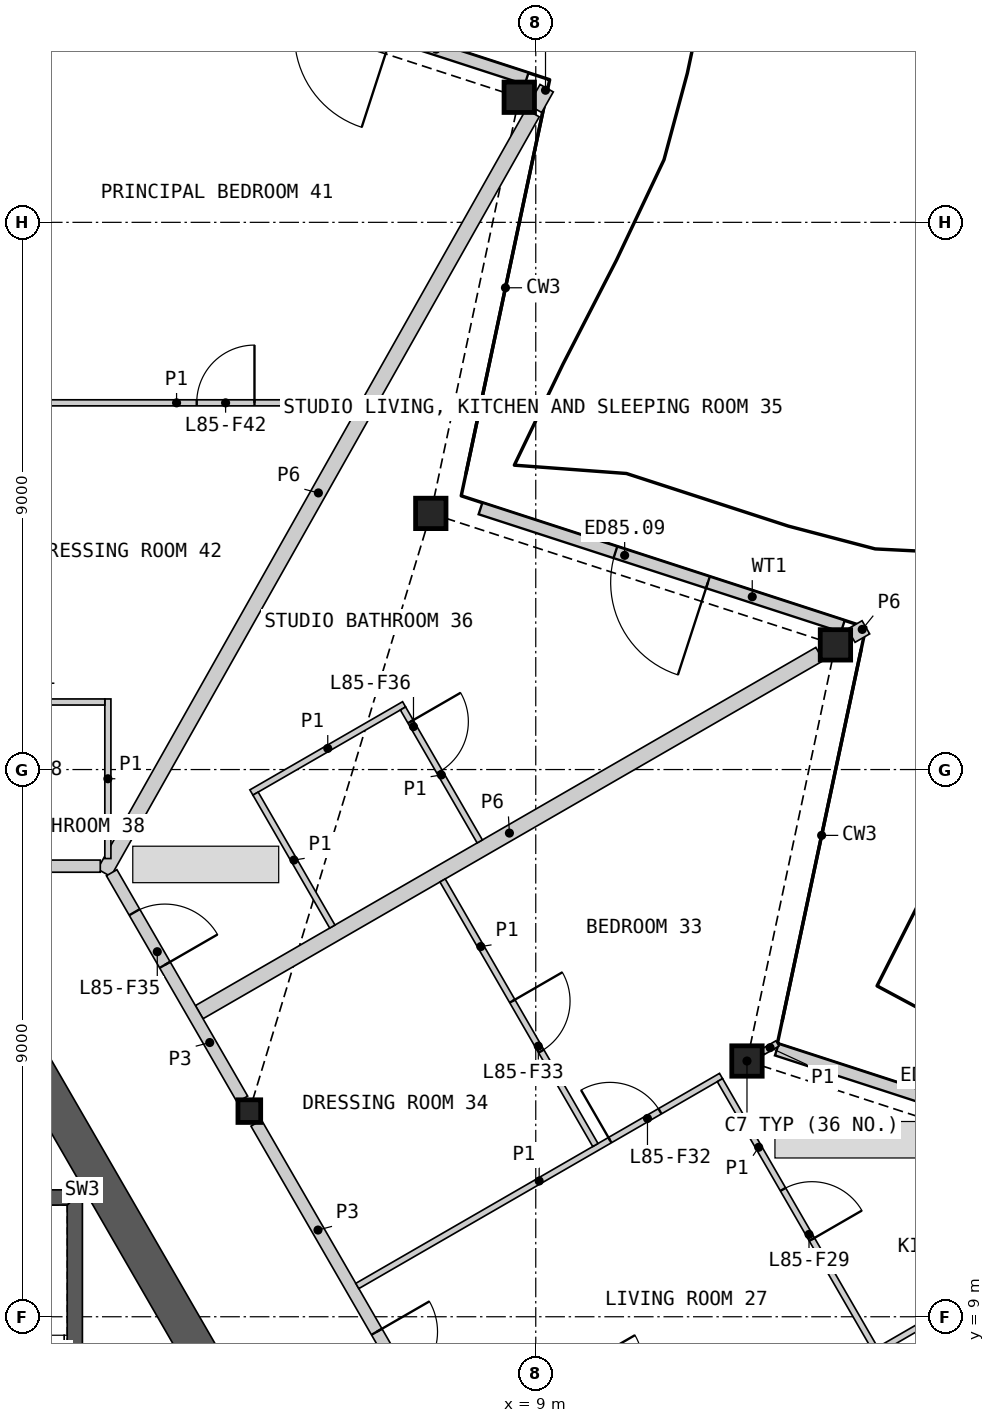
"""IFC4 building model, lengths in metres.
Left out: names, types, materials, properties, quantities, classifications, styles, units other than length and angle.
Written with IfcOpenShell. Run it as: python <this file> out.ifc"""

import sys

from ifc_helpers import new_model, si_unit, direction, frame, frame_2d, origin, origin_2d, place, context, subcontext, project, spatial, polyline, rectangle, hollow_rectangle, i_section, outline, extrude, element, fill, save


model = new_model("IFC4")
c1 = context("Model", 3, precision=1e-05, world=origin(), true_north=direction((0.0, 1.0)))
c2 = subcontext(c1, "Body", "Model", "MODEL_VIEW")
j1 = project(units=[si_unit("LENGTHUNIT", "METRE"), si_unit("PLANEANGLEUNIT", "RADIAN")], contexts=[c1])
p1 = place(None, origin())
s1 = spatial("IfcSite", under=j1, at=p1, CompositionType="ELEMENT")
p2 = place(p1, origin())
s2 = spatial("IfcBuilding", under=s1, at=p2, CompositionType="ELEMENT")
p3 = place(p2, frame((0.0, 0.0, 378.0)))
s3 = spatial("IfcBuildingStorey", under=s2, at=p3, CompositionType="ELEMENT", Elevation=378.0)
for number, where, z_axis, x_axis in (
    (1, (12.474, 13.206, 0.0), (0.0, 0.0, 1.0), (1.0, 0.0, 0.0)),
    (2, (13.929, 20.051, 0.0), (0.0, 0.0, 1.0), (1.0, 0.0, 0.0)),
    (3, (7.274, 22.213, 0.0), (0.0, 0.0, 1.0), (1.0, 0.0, 0.0)),
    (4, (8.729, 29.057, 0.0), (0.0, 0.0, 1.0), (1.0, 0.0, 0.0)),
):
    element("IfcColumn", number, at=place(p3, frame(where, z_axis=z_axis, x_axis=x_axis)), inside=s3, PredefinedType="COLUMN", context=c2, shape_type="SweptSolid", body=[
        extrude(hollow_rectangle(XDim=0.5, YDim=0.5, WallThickness=0.03, at=origin_2d()), origin(), (0.0, 0.0, 1.0), 3.4),
    ])
p4 = place(p3, frame((4.289, 12.382, 0.0), z_axis=(0.0, 0.0, 1.0), x_axis=(1.0, 0.0, 0.0)))
e5 = element("IfcColumn", 5, at=p4, inside=s3, PredefinedType="COLUMN", context=c2, shape_type="SweptSolid", body=[
    extrude(i_section(OverallWidth=0.374, OverallDepth=0.372, WebThickness=0.016, FlangeThickness=0.026, at=origin_2d()), origin(), (0.0, 0.0, 1.0), 3.4),
])
p5 = place(p3, frame((19.25, 11.351, 0.0), z_axis=(0.0, 0.0, 1.0), x_axis=(-0.951060668786, 0.309004214029, 0.0)))
e6 = element("IfcWall", 6, at=p5, inside=s3, PredefinedType="SOLIDWALL", context=c2, shape_type="SweptSolid", body=[
    extrude(rectangle(XDim=6.609, YDim=0.2, at=frame_2d((3.305, 0.0))), origin(), (0.0, 0.0, 1.0), 2.634),
])
p6 = place(p5, frame((2.333, 0.0, 0.0)))
e7 = element("IfcOpeningElement", 7, at=p6, cuts=e6, PredefinedType="OPENING", context=c2, shape_type="SweptSolid", body=[
    extrude(rectangle(XDim=1.6, YDim=2.25, at=frame_2d((0.8, 1.125))), frame((0.0, 0.11, 0.0), z_axis=(0.0, -1.0, 0.0), x_axis=(1.0, 0.0, 0.0)), (0.0, 0.0, 1.0), 0.22),
])
p7 = place(p3, frame((14.05, 20.357, 0.0), z_axis=(0.0, 0.0, 1.0), x_axis=(-0.951060123915, 0.309005891041, 0.0)))
e8 = element("IfcWall", 8, at=p7, inside=s3, PredefinedType="SOLIDWALL", context=c2, shape_type="SweptSolid", body=[
    extrude(rectangle(XDim=6.265, YDim=0.2, at=frame_2d((3.133, 0.0))), origin(), (0.0, 0.0, 1.0), 2.634),
])
p8 = place(p7, frame((2.333, 0.0, 0.0)))
e9 = element("IfcOpeningElement", 9, at=p8, cuts=e8, PredefinedType="OPENING", context=c2, shape_type="SweptSolid", body=[
    extrude(rectangle(XDim=1.6, YDim=2.25, at=frame_2d((0.8, 1.125))), frame((0.0, 0.11, 0.0), z_axis=(0.0, -1.0, 0.0), x_axis=(1.0, 0.0, 0.0)), (0.0, 0.0, 1.0), 0.22),
])
p9 = place(p3, frame((8.85, 29.364, 0.0), z_axis=(0.0, 0.0, 1.0), x_axis=(-0.951048671744, 0.309041136379, 0.0)))
e10 = element("IfcWall", 10, at=p9, inside=s3, PredefinedType="SOLIDWALL", context=c2, shape_type="SweptSolid", body=[
    extrude(rectangle(XDim=6.265, YDim=0.2, at=frame_2d((3.133, 0.0))), origin(), (0.0, 0.0, 1.0), 2.634),
])
p10 = place(p9, frame((2.333, 0.0, 0.0)))
e11 = element("IfcOpeningElement", 11, at=p10, cuts=e10, PredefinedType="OPENING", context=c2, shape_type="SweptSolid", body=[
    extrude(rectangle(XDim=1.6, YDim=2.25, at=frame_2d((0.8, 1.125))), frame((0.0, 0.11, 0.0), z_axis=(0.0, -1.0, 0.0), x_axis=(1.0, 0.0, 0.0)), (0.0, 0.0, 1.0), 0.22),
])
p11 = place(p3, origin())
e12 = element("IfcWall", 12, at=p11, inside=s3, PredefinedType="SHEAR", context=c2, shape_type="SweptSolid", body=[
    extrude(outline(polyline([(1.544, 5.237), (1.544, 11.087), (1.294, 10.837), (1.294, 5.237), (1.544, 5.237)])), origin(), (0.0, 0.0, 1.0), 3.1),
])
p12 = place(p3, origin())
e13 = element("IfcWall", 13, at=p12, inside=s3, PredefinedType="SHEAR", context=c2, shape_type="SweptSolid", body=[
    extrude(outline(polyline([(1.544, 11.087), (-1.544, 11.087), (-1.294, 10.837), (1.294, 10.837), (1.544, 11.087)])), origin(), (0.0, 0.0, 1.0), 3.1),
])
p13 = place(p3, frame((8.686, -0.634, 0.0), z_axis=(0.0, 0.0, 1.0), x_axis=(-0.500004601921, 0.866022746848, 0.0)))
e14 = element("IfcWall", 14, at=p13, inside=s3, PredefinedType="SHEAR", context=c2, shape_type="SweptSolid", body=[
    extrude(rectangle(XDim=16.853, YDim=0.6, at=frame_2d((8.426, 0.0))), origin(), (0.0, 0.0, 1.0), 3.1),
])
p14 = place(p3, frame((1.902, 16.302, 0.0), z_axis=(0.0, 0.0, 1.0), x_axis=(0.491233789602, 0.871027763021, 0.0)))
e15 = element("IfcWall", 15, at=p14, inside=s3, PredefinedType="PARTITIONING", context=c2, shape_type="SweptSolid", body=[
    extrude(rectangle(XDim=14.345, YDim=0.25, at=frame_2d((7.173, 0.0))), origin(), (0.0, 0.0, 1.0), 2.33),
])
p15 = place(p3, frame((3.465, 14.01, 0.0), z_axis=(0.0, 0.0, 1.0), x_axis=(0.866032376801, 0.499987922186, 0.0)))
e16 = element("IfcWall", 16, at=p15, inside=s3, PredefinedType="PARTITIONING", context=c2, shape_type="SweptSolid", body=[
    extrude(rectangle(XDim=11.782, YDim=0.25, at=frame_2d((5.891, 0.0))), origin(), (0.0, 0.0, 1.0), 2.33),
])
p16 = place(p3, frame((4.403, 12.185, 0.0), z_axis=(0.0, 0.0, 1.0), x_axis=(0.499992155518, -0.866029932751, 0.0)))
e17 = element("IfcWall", 17, at=p16, inside=s3, PredefinedType="PARTITIONING", context=c2, shape_type="SweptSolid", body=[
    extrude(rectangle(XDim=8.123, YDim=0.2, at=frame_2d((4.062, 0.0))), origin(), (0.0, 0.0, 1.0), 3.1),
])
p17 = place(p16, frame((3.963, 0.0, 0.0)))
e18 = element("IfcOpeningElement", 18, at=p17, cuts=e17, PredefinedType="OPENING", context=c2, shape_type="SweptSolid", body=[
    extrude(rectangle(XDim=1.0, YDim=2.1, at=frame_2d((0.5, 1.05))), frame((0.0, 0.11, 0.0), z_axis=(0.0, -1.0, 0.0), x_axis=(1.0, 0.0, 0.0)), (0.0, 0.0, 1.0), 0.22),
])
p18 = place(p3, frame((2.025, 16.303, 0.0), z_axis=(0.0, 0.0, 1.0), x_axis=(0.500004215162, -0.866022970146, 0.0)))
e19 = element("IfcWall", 19, at=p18, inside=s3, PredefinedType="PARTITIONING", context=c2, shape_type="SweptSolid", body=[
    extrude(rectangle(XDim=4.3, YDim=0.2, at=frame_2d((2.15, 0.0))), origin(), (0.0, 0.0, 1.0), 3.1),
])
p19 = place(p18, frame((0.75, 0.0, 0.0)))
e20 = element("IfcOpeningElement", 20, at=p19, cuts=e19, PredefinedType="OPENING", context=c2, shape_type="SweptSolid", body=[
    extrude(rectangle(XDim=1.0, YDim=2.1, at=frame_2d((0.5, 1.05))), frame((0.0, 0.11, 0.0), z_axis=(0.0, -1.0, 0.0), x_axis=(1.0, 0.0, 0.0)), (0.0, 0.0, 1.0), 0.22),
])
p20 = place(p3, frame((-1.863, 16.411, 0.0), z_axis=(0.0, 0.0, 1.0), x_axis=(1.0, 0.0, 0.0)))
e21 = element("IfcWall", 21, at=p20, inside=s3, PredefinedType="PARTITIONING", context=c2, shape_type="SweptSolid", body=[
    extrude(rectangle(XDim=3.701, YDim=0.2, at=frame_2d((1.851, 0.0))), origin(), (0.0, 0.0, 1.0), 3.1),
])
p21 = place(p20, frame((0.25, 0.0, 0.0)))
e22 = element("IfcOpeningElement", 22, at=p21, cuts=e21, PredefinedType="OPENING", context=c2, shape_type="SweptSolid", body=[
    extrude(rectangle(XDim=1.0, YDim=2.1, at=frame_2d((0.5, 1.05))), frame((0.0, 0.11, 0.0), z_axis=(0.0, -1.0, 0.0), x_axis=(1.0, 0.0, 0.0)), (0.0, 0.0, 1.0), 0.22),
])
p22 = place(p3, frame((8.989, 28.868, 0.0), z_axis=(0.0, 0.0, 1.0), x_axis=(0.491394522511, 0.870937094885, 0.0)))
e23 = element("IfcWall", 23, at=p22, inside=s3, PredefinedType="PARTITIONING", context=c2, shape_type="SweptSolid", body=[
    extrude(rectangle(XDim=0.388, YDim=0.25, at=frame_2d((0.194, 0.0))), origin(), (0.0, 0.0, 1.0), 2.33),
])
p23 = place(p3, frame((14.189, 20.201, 0.0), z_axis=(0.0, 0.0, 1.0), x_axis=(0.865687176694, 0.50058536945, 0.0)))
e24 = element("IfcWall", 24, at=p23, inside=s3, PredefinedType="PARTITIONING", context=c2, shape_type="SweptSolid", body=[
    extrude(rectangle(XDim=0.278, YDim=0.25, at=frame_2d((0.139, 0.0))), origin(), (0.0, 0.0, 1.0), 2.33),
])
p24 = place(p3, frame((8.775, 5.066, 0.0), z_axis=(0.0, 0.0, 1.0), x_axis=(0.866023724155, 0.500002909193, 0.0)))
e25 = element("IfcWall", 25, at=p24, inside=s3, PredefinedType="PARTITIONING", context=c2, shape_type="SweptSolid", body=[
    extrude(rectangle(XDim=11.655, YDim=0.1, at=frame_2d((5.827, 0.0))), origin(), (0.0, 0.0, 1.0), 2.33),
])
p25 = place(p24, frame((3.751, 0.0, 0.0)))
e26 = element("IfcOpeningElement", 26, at=p25, cuts=e25, PredefinedType="OPENING", context=c2, shape_type="SweptSolid", body=[
    extrude(rectangle(XDim=0.95, YDim=2.1, at=frame_2d((0.475, 1.05))), frame((0.0, 0.06, 0.0), z_axis=(0.0, -1.0, 0.0), x_axis=(1.0, 0.0, 0.0)), (0.0, 0.0, 1.0), 0.12),
])
p26 = place(p3, frame((6.065, 9.506, 0.0), z_axis=(0.0, 0.0, 1.0), x_axis=(0.866029020252, 0.499993736042, 0.0)))
e27 = element("IfcWall", 27, at=p26, inside=s3, PredefinedType="PARTITIONING", context=c2, shape_type="SweptSolid", body=[
    extrude(rectangle(XDim=6.907, YDim=0.1, at=frame_2d((3.454, 0.0))), origin(), (0.0, 0.0, 1.0), 2.33),
])
p27 = place(p26, frame((4.798, 0.0, 0.0)))
e28 = element("IfcOpeningElement", 28, at=p27, cuts=e27, PredefinedType="OPENING", context=c2, shape_type="SweptSolid", body=[
    extrude(rectangle(XDim=0.95, YDim=2.1, at=frame_2d((0.475, 1.05))), frame((0.0, 0.06, 0.0), z_axis=(0.0, -1.0, 0.0), x_axis=(1.0, 0.0, 0.0)), (0.0, 0.0, 1.0), 0.12),
])
p28 = place(p3, frame((0.05, 24.031, 0.0), z_axis=(0.0, 0.0, 1.0), x_axis=(1.0, 0.0, 0.0)))
e29 = element("IfcWall", 29, at=p28, inside=s3, PredefinedType="PARTITIONING", context=c2, shape_type="SweptSolid", body=[
    extrude(rectangle(XDim=6.086, YDim=0.1, at=frame_2d((3.043, 0.0))), origin(), (0.0, 0.0, 1.0), 2.33),
])
p29 = place(p28, frame((3.374, 0.0, 0.0)))
e30 = element("IfcOpeningElement", 30, at=p29, cuts=e29, PredefinedType="OPENING", context=c2, shape_type="SweptSolid", body=[
    extrude(rectangle(XDim=0.95, YDim=2.1, at=frame_2d((0.475, 1.05))), frame((0.0, 0.06, 0.0), z_axis=(0.0, -1.0, 0.0), x_axis=(1.0, 0.0, 0.0)), (0.0, 0.0, 1.0), 0.12),
])
p30 = place(p3, frame((7.468, 16.176, 0.0), z_axis=(0.0, 0.0, 1.0), x_axis=(0.499990214365, -0.86603105345, 0.0)))
e31 = element("IfcWall", 31, at=p30, inside=s3, PredefinedType="PARTITIONING", context=c2, shape_type="SweptSolid", body=[
    extrude(rectangle(XDim=5.025, YDim=0.1, at=frame_2d((2.512, 0.0))), origin(), (0.0, 0.0, 1.0), 2.33),
])
p31 = place(p30, frame((2.293, 0.0, 0.0)))
e32 = element("IfcOpeningElement", 32, at=p31, cuts=e31, PredefinedType="OPENING", context=c2, shape_type="SweptSolid", body=[
    extrude(rectangle(XDim=0.95, YDim=2.1, at=frame_2d((0.475, 1.05))), frame((0.0, 0.06, 0.0), z_axis=(0.0, -1.0, 0.0), x_axis=(1.0, 0.0, 0.0)), (0.0, 0.0, 1.0), 0.12),
])
p32 = place(p3, frame((12.029, 12.892, 0.0), z_axis=(0.0, 0.0, 1.0), x_axis=(0.500005610874, -0.86602216432, 0.0)))
e33 = element("IfcWall", 33, at=p32, inside=s3, PredefinedType="PARTITIONING", context=c2, shape_type="SweptSolid", body=[
    extrude(rectangle(XDim=5.1, YDim=0.1, at=frame_2d((2.55, 0.0))), origin(), (0.0, 0.0, 1.0), 2.33),
])
p33 = place(p32, frame((2.075, 0.0, 0.0)))
e34 = element("IfcOpeningElement", 34, at=p33, cuts=e33, PredefinedType="OPENING", context=c2, shape_type="SweptSolid", body=[
    extrude(rectangle(XDim=0.95, YDim=2.1, at=frame_2d((0.475, 1.05))), frame((0.0, 0.06, 0.0), z_axis=(0.0, -1.0, 0.0), x_axis=(1.0, 0.0, 0.0)), (0.0, 0.0, 1.0), 0.12),
])
p34 = place(p3, frame((4.323, 17.623, 0.0), z_axis=(0.0, 0.0, 1.0), x_axis=(0.866032775405, 0.499987231761, 0.0)))
e35 = element("IfcWall", 35, at=p34, inside=s3, PredefinedType="PARTITIONING", context=c2, shape_type="SweptSolid", body=[
    extrude(rectangle(XDim=2.9, YDim=0.1, at=frame_2d((1.45, 0.0))), origin(), (0.0, 0.0, 1.0), 2.33),
])
p35 = place(p3, frame((1.963, 16.536, 0.0), z_axis=(0.0, 0.0, 1.0), x_axis=(0.0, 1.0, 0.0)))
e36 = element("IfcWall", 36, at=p35, inside=s3, PredefinedType="PARTITIONING", context=c2, shape_type="SweptSolid", body=[
    extrude(rectangle(XDim=2.625, YDim=0.1, at=frame_2d((1.312, 0.0))), origin(), (0.0, 0.0, 1.0), 2.33),
])
p36 = place(p3, frame((6.817, 19.004, 0.0), z_axis=(0.0, 0.0, 1.0), x_axis=(0.499976333282, -0.866039067339, 0.0)))
e37 = element("IfcWall", 37, at=p36, inside=s3, PredefinedType="PARTITIONING", context=c2, shape_type="SweptSolid", body=[
    extrude(rectangle(XDim=2.525, YDim=0.1, at=frame_2d((1.262, 0.0))), origin(), (0.0, 0.0, 1.0), 2.33),
])
p37 = place(p36, frame((0.25, 0.0, 0.0)))
e38 = element("IfcOpeningElement", 38, at=p37, cuts=e37, PredefinedType="OPENING", context=c2, shape_type="SweptSolid", body=[
    extrude(rectangle(XDim=0.95, YDim=2.1, at=frame_2d((0.475, 1.05))), frame((0.0, 0.06, 0.0), z_axis=(0.0, -1.0, 0.0), x_axis=(1.0, 0.0, 0.0)), (0.0, 0.0, 1.0), 0.12),
])
p38 = place(p3, frame((4.392, 17.604, 0.0), z_axis=(0.0, 0.0, 1.0), x_axis=(0.500048846702, -0.865997200291, 0.0)))
e39 = element("IfcWall", 39, at=p38, inside=s3, PredefinedType="PARTITIONING", context=c2, shape_type="SweptSolid", body=[
    extrude(rectangle(XDim=2.525, YDim=0.1, at=frame_2d((1.263, 0.0))), origin(), (0.0, 0.0, 1.0), 2.33),
])
p39 = place(p3, frame((-0.06, 19.111, 0.0), z_axis=(0.0, 0.0, 1.0), x_axis=(1.0, 0.0, 0.0)))
e40 = element("IfcWall", 40, at=p39, inside=s3, PredefinedType="PARTITIONING", context=c2, shape_type="SweptSolid", body=[
    extrude(rectangle(XDim=1.973, YDim=0.1, at=frame_2d((0.987, 0.0))), origin(), (0.0, 0.0, 1.0), 2.33),
])
p40 = place(p3, frame((12.734, 13.356, 0.0), z_axis=(0.0, 0.0, 1.0), x_axis=(0.865687176694, 0.50058536945, 0.0)))
e41 = element("IfcWall", 41, at=p40, inside=s3, PredefinedType="PARTITIONING", context=c2, shape_type="SweptSolid", body=[
    extrude(rectangle(XDim=0.278, YDim=0.1, at=frame_2d((0.139, 0.0))), origin(), (0.0, 0.0, 1.0), 2.33),
])
p41 = place(p8, origin())
e42 = element("IfcDoor", 42, at=p41, inside=s3, OperationType="DOUBLE_DOOR_SINGLE_SWING", PredefinedType="DOOR", context=c2, shape_type="SweptSolid", body=[
    extrude(rectangle(XDim=1.6, YDim=2.25, at=frame_2d((0.8, 1.125))), frame((0.0, 0.025, 0.0), z_axis=(0.0, -1.0, 0.0), x_axis=(1.0, 0.0, 0.0)), (0.0, 0.0, 1.0), 0.05),
])
fill(e9, e42)
p42 = place(p17, origin())
e43 = element("IfcDoor", 43, at=p42, inside=s3, OperationType="SINGLE_SWING_LEFT", PredefinedType="DOOR", context=c2, shape_type="SweptSolid", body=[
    extrude(rectangle(XDim=1.0, YDim=2.1, at=frame_2d((0.5, 1.05))), frame((0.0, 0.025, 0.0), z_axis=(0.0, -1.0, 0.0), x_axis=(1.0, 0.0, 0.0)), (0.0, 0.0, 1.0), 0.05),
])
fill(e18, e43)
p43 = place(p33, origin())
e44 = element("IfcDoor", 44, at=p43, inside=s3, OperationType="SINGLE_SWING_RIGHT", PredefinedType="DOOR", context=c2, shape_type="SweptSolid", body=[
    extrude(rectangle(XDim=0.95, YDim=2.1, at=frame_2d((0.475, 1.05))), frame((0.0, 0.025, 0.0), z_axis=(0.0, -1.0, 0.0), x_axis=(1.0, 0.0, 0.0)), (0.0, 0.0, 1.0), 0.05),
])
fill(e34, e44)
p44 = place(p27, origin())
e45 = element("IfcDoor", 45, at=p44, inside=s3, OperationType="SINGLE_SWING_LEFT", PredefinedType="DOOR", context=c2, shape_type="SweptSolid", body=[
    extrude(rectangle(XDim=0.95, YDim=2.1, at=frame_2d((0.475, 1.05))), frame((0.0, 0.025, 0.0), z_axis=(0.0, -1.0, 0.0), x_axis=(1.0, 0.0, 0.0)), (0.0, 0.0, 1.0), 0.05),
])
fill(e28, e45)
p45 = place(p31, origin())
e46 = element("IfcDoor", 46, at=p45, inside=s3, OperationType="SINGLE_SWING_LEFT", PredefinedType="DOOR", context=c2, shape_type="SweptSolid", body=[
    extrude(rectangle(XDim=0.95, YDim=2.1, at=frame_2d((0.475, 1.05))), frame((0.0, 0.025, 0.0), z_axis=(0.0, -1.0, 0.0), x_axis=(1.0, 0.0, 0.0)), (0.0, 0.0, 1.0), 0.05),
])
fill(e32, e46)
p46 = place(p19, origin())
e47 = element("IfcDoor", 47, at=p46, inside=s3, OperationType="SINGLE_SWING_RIGHT", PredefinedType="DOOR", context=c2, shape_type="SweptSolid", body=[
    extrude(rectangle(XDim=1.0, YDim=2.1, at=frame_2d((0.5, 1.05))), frame((0.0, 0.025, 0.0), z_axis=(0.0, -1.0, 0.0), x_axis=(1.0, 0.0, 0.0)), (0.0, 0.0, 1.0), 0.05),
])
fill(e20, e47)
p47 = place(p37, origin())
e48 = element("IfcDoor", 48, at=p47, inside=s3, OperationType="SINGLE_SWING_LEFT", PredefinedType="DOOR", context=c2, shape_type="SweptSolid", body=[
    extrude(rectangle(XDim=0.95, YDim=2.1, at=frame_2d((0.475, 1.05))), frame((0.0, 0.025, 0.0), z_axis=(0.0, -1.0, 0.0), x_axis=(1.0, 0.0, 0.0)), (0.0, 0.0, 1.0), 0.05),
])
fill(e38, e48)
p48 = place(p29, origin())
e49 = element("IfcDoor", 49, at=p48, inside=s3, OperationType="SINGLE_SWING_RIGHT", PredefinedType="DOOR", context=c2, shape_type="SweptSolid", body=[
    extrude(rectangle(XDim=0.95, YDim=2.1, at=frame_2d((0.475, 1.05))), frame((0.0, 0.025, 0.0), z_axis=(0.0, -1.0, 0.0), x_axis=(1.0, 0.0, 0.0)), (0.0, 0.0, 1.0), 0.05),
])
fill(e30, e49)
save(model, sys.argv[1])
